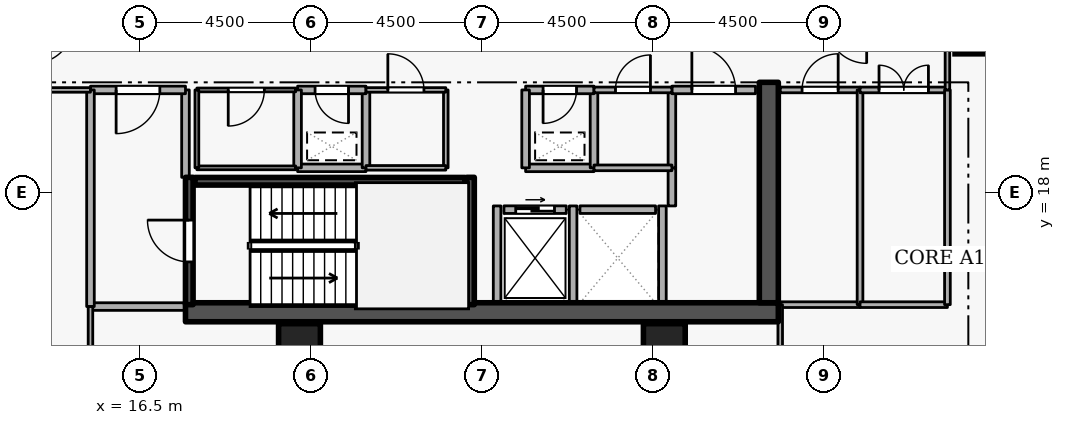
"""IFC4 building model, lengths in metres.
Left out: names, types, materials, properties, quantities, classifications, styles, units other than length and angle.
Written with IfcOpenShell. Run it as: python <this file> out.ifc"""

import sys

from ifc_helpers import new_model, si_unit, direction, frame, frame_2d, origin, origin_2d, place, context, subcontext, project, spatial, rectangle, extrude, element, fill, save


model = new_model("IFC4")
c1 = context("Model", 3, precision=1e-05, world=origin(), true_north=direction((0.0, 1.0)))
c2 = subcontext(c1, "Body", "Model", "MODEL_VIEW")
j1 = project(units=[si_unit("LENGTHUNIT", "METRE"), si_unit("PLANEANGLEUNIT", "RADIAN")], contexts=[c1])
p1 = place(None, origin())
s1 = spatial("IfcSite", under=j1, at=p1, CompositionType="ELEMENT")
p2 = place(p1, origin())
s2 = spatial("IfcBuilding", under=s1, at=p2, CompositionType="ELEMENT")
p3 = place(p2, frame((0.0, 0.0, 159.9)))
s3 = spatial("IfcBuildingStorey", under=s2, at=p3, CompositionType="ELEMENT", Elevation=159.9)
p4 = place(p3, frame((17.7, 14.85, 0.0), z_axis=(0.0, 0.0, 1.0), x_axis=(1.0, 0.0, 0.0)))
e1 = element("IfcWall", 1, at=p4, inside=s3, PredefinedType="SHEAR", context=c2, shape_type="SweptSolid", body=[
    extrude(rectangle(XDim=15.6, YDim=0.5, at=frame_2d((7.8, 0.0))), origin(), (0.0, 0.0, 1.0), 3.6),
])
p5 = place(p3, frame((33.05, 15.1, 0.0), z_axis=(0.0, 0.0, 1.0), x_axis=(0.0, 1.0, 0.0)))
e2 = element("IfcWall", 2, at=p5, inside=s3, PredefinedType="SHEAR", context=c2, shape_type="SweptSolid", body=[
    extrude(rectangle(XDim=5.8, YDim=0.5, at=frame_2d((2.9, 0.0))), origin(), (0.0, 0.0, 1.0), 3.6),
])
for number, where, z_axis, x_axis in (
    (3, (38.5, 22.2, 0.0), (0.0, 0.0, 1.0), (1.0, 0.0, 0.0)),
    (4, (20.7, 14.0, 0.0), (0.0, 0.0, 1.0), (1.0, 0.0, 0.0)),
    (5, (30.3, 14.0, 0.0), (0.0, 0.0, 1.0), (1.0, 0.0, 0.0)),
):
    element("IfcColumn", number, at=place(p3, frame(where, z_axis=z_axis, x_axis=x_axis)), inside=s3, PredefinedType="COLUMN", context=c2, shape_type="SweptSolid", body=[
        extrude(rectangle(XDim=1.1, YDim=1.1, at=origin_2d()), origin(), (0.0, 0.0, 1.0), 3.6),
    ])
p6 = place(p3, frame((26.08, 17.55, 0.0), z_axis=(0.0, 0.0, 1.0), x_axis=(1.0, 0.0, 0.0)))
e6 = element("IfcWall", 6, at=p6, inside=s3, PredefinedType="STANDARD", context=c2, shape_type="SweptSolid", body=[
    extrude(rectangle(XDim=1.64, YDim=0.2, at=frame_2d((0.82, 0.0))), origin(), (0.0, 0.0, 1.0), 3.34),
])
p7 = place(p6, frame((0.31, 0.0, 0.0)))
e7 = element("IfcOpeningElement", 7, at=p7, cuts=e6, PredefinedType="OPENING", context=c2, shape_type="SweptSolid", body=[
    extrude(rectangle(XDim=1.02, YDim=2.06, at=frame_2d((0.51, 1.03))), frame((0.0, 0.11, 0.0), z_axis=(0.0, -1.0, 0.0), x_axis=(1.0, 0.0, 0.0)), (0.0, 0.0, 1.0), 0.22),
])
p8 = place(p3, frame((28.08, 17.55, 0.0), z_axis=(0.0, 0.0, 1.0), x_axis=(1.0, 0.0, 0.0)))
e8 = element("IfcWall", 8, at=p8, inside=s3, PredefinedType="STANDARD", context=c2, shape_type="SweptSolid", body=[
    extrude(rectangle(XDim=1.99, YDim=0.2, at=frame_2d((0.995, 0.0))), origin(), (0.0, 0.0, 1.0), 3.34),
])
for number, where, z_axis, x_axis in (
    (9, (27.9, 15.112, 0.0), (0.0, 0.0, 1.0), (0.0, 1.0, 0.0)),
    (10, (25.9, 15.112, 0.0), (0.0, 0.0, 1.0), (0.0, 1.0, 0.0)),
    (11, (30.25, 15.112, 0.0), (0.0, 0.0, 1.0), (0.0, 1.0, 0.0)),
):
    element("IfcWall", number, at=place(p3, frame(where, z_axis=z_axis, x_axis=x_axis)), inside=s3, PredefinedType="STANDARD", context=c2, shape_type="SweptSolid", body=[
        extrude(rectangle(XDim=2.536, YDim=0.2, at=frame_2d((1.268, 0.0))), origin(), (0.0, 0.0, 1.0), 3.34),
    ])
p9 = place(p3, frame((17.8, 15.05, 0.0), z_axis=(0.0, 0.0, 1.0), x_axis=(0.0, 1.0, 0.0)))
e12 = element("IfcWall", 12, at=p9, inside=s3, PredefinedType="SHEAR", context=c2, shape_type="SweptSolid", body=[
    extrude(rectangle(XDim=3.35, YDim=0.2, at=frame_2d((1.675, 0.0))), origin(), (0.0, 0.0, 1.0), 3.6),
])
p10 = place(p9, frame((1.125, 0.0, 0.0)))
e13 = element("IfcOpeningElement", 13, at=p10, cuts=e12, PredefinedType="OPENING", context=c2, shape_type="SweptSolid", body=[
    extrude(rectangle(XDim=1.1, YDim=2.1, at=frame_2d((0.55, 1.05))), frame((0.0, 0.11, 0.0), z_axis=(0.0, -1.0, 0.0), x_axis=(1.0, 0.0, 0.0)), (0.0, 0.0, 1.0), 0.22),
])
p11 = place(p3, frame((25.2, 18.4, 0.0), z_axis=(0.0, 0.0, 1.0), x_axis=(0.0, -1.0, 0.0)))
e14 = element("IfcWall", 14, at=p11, inside=s3, PredefinedType="SHEAR", context=c2, shape_type="SweptSolid", body=[
    extrude(rectangle(XDim=3.35, YDim=0.2, at=frame_2d((1.675, 0.0))), origin(), (0.0, 0.0, 1.0), 3.6),
])
p12 = place(p3, frame((25.05, 18.297, 0.0), z_axis=(0.0, 0.0, 1.0), x_axis=(-1.0, 0.0, 0.0)))
e15 = element("IfcWall", 15, at=p12, inside=s3, PredefinedType="SHEAR", context=c2, shape_type="SweptSolid", body=[
    extrude(rectangle(XDim=7.1, YDim=0.2, at=frame_2d((3.55, 0.0))), origin(), (0.0, 0.0, 1.0), 3.6),
])
p13 = place(p3, frame((15.2, 15.0, 0.0), z_axis=(0.0, 0.0, 1.0), x_axis=(1.0, 0.0, 0.0)))
e16 = element("IfcWall", 16, at=p13, inside=s3, PredefinedType="STANDARD", context=c2, shape_type="SweptSolid", body=[
    extrude(rectangle(XDim=2.5, YDim=0.2, at=frame_2d((1.25, 0.0))), origin(), (0.0, 0.0, 1.0), 3.34),
])
p14 = place(p3, frame((17.7, 18.4, 0.0), z_axis=(0.0, 0.0, 1.0), x_axis=(0.0, 1.0, 0.0)))
e17 = element("IfcWall", 17, at=p14, inside=s3, PredefinedType="STANDARD", context=c2, shape_type="SweptSolid", body=[
    extrude(rectangle(XDim=2.3, YDim=0.2, at=frame_2d((1.15, 0.0))), origin(), (0.0, 0.0, 1.0), 2.545),
])
p15 = place(p3, frame((17.7, 20.7, 0.0), z_axis=(0.0, 0.0, 1.0), x_axis=(-1.0, 0.0, 0.0)))
e18 = element("IfcWall", 18, at=p15, inside=s3, PredefinedType="STANDARD", context=c2, shape_type="SweptSolid", body=[
    extrude(rectangle(XDim=2.5, YDim=0.2, at=frame_2d((1.25, 0.0))), origin(), (0.0, 0.0, 1.0), 3.34),
])
p16 = place(p15, frame((0.675, 0.0, 0.0)))
e19 = element("IfcOpeningElement", 19, at=p16, cuts=e18, PredefinedType="OPENING", context=c2, shape_type="SweptSolid", body=[
    extrude(rectangle(XDim=1.15, YDim=2.1, at=frame_2d((0.575, 1.05))), frame((0.0, 0.11, 0.0), z_axis=(0.0, -1.0, 0.0), x_axis=(1.0, 0.0, 0.0)), (0.0, 0.0, 1.0), 0.22),
])
p17 = place(p3, frame((15.2, 20.7, 0.0), z_axis=(0.0, 0.0, 1.0), x_axis=(0.0, -1.0, 0.0)))
e20 = element("IfcWall", 20, at=p17, inside=s3, PredefinedType="STANDARD", context=c2, shape_type="SweptSolid", body=[
    extrude(rectangle(XDim=5.7, YDim=0.2, at=frame_2d((2.85, 0.0))), origin(), (0.0, 0.0, 1.0), 3.34),
])
p18 = place(p3, frame((26.65, 18.65, 0.0), z_axis=(0.0, 0.0, 1.0), x_axis=(1.0, 0.0, 0.0)))
e21 = element("IfcWall", 21, at=p18, inside=s3, PredefinedType="STANDARD", context=c2, shape_type="SweptSolid", body=[
    extrude(rectangle(XDim=1.8, YDim=0.2, at=frame_2d((0.9, 0.0))), origin(), (0.0, 0.0, 1.0), 3.34),
])
p19 = place(p3, frame((28.45, 18.65, 0.0), z_axis=(0.0, 0.0, 1.0), x_axis=(0.0, 1.0, 0.0)))
e22 = element("IfcWall", 22, at=p19, inside=s3, PredefinedType="STANDARD", context=c2, shape_type="SweptSolid", body=[
    extrude(rectangle(XDim=2.05, YDim=0.2, at=frame_2d((1.025, 0.0))), origin(), (0.0, 0.0, 1.0), 3.34),
])
p20 = place(p3, frame((28.45, 20.7, 0.0), z_axis=(0.0, 0.0, 1.0), x_axis=(-1.0, 0.0, 0.0)))
e23 = element("IfcWall", 23, at=p20, inside=s3, PredefinedType="STANDARD", context=c2, shape_type="SweptSolid", body=[
    extrude(rectangle(XDim=1.8, YDim=0.2, at=frame_2d((0.9, 0.0))), origin(), (0.0, 0.0, 1.0), 3.34),
])
p21 = place(p20, frame((0.46, 0.0, 0.0)))
e24 = element("IfcOpeningElement", 24, at=p21, cuts=e23, PredefinedType="OPENING", context=c2, shape_type="SweptSolid", body=[
    extrude(rectangle(XDim=0.88, YDim=2.04, at=frame_2d((0.44, 1.02))), frame((0.0, 0.11, 0.0), z_axis=(0.0, -1.0, 0.0), x_axis=(1.0, 0.0, 0.0)), (0.0, 0.0, 1.0), 0.22),
])
p22 = place(p3, frame((26.65, 20.7, 0.0), z_axis=(0.0, 0.0, 1.0), x_axis=(0.0, -1.0, 0.0)))
e25 = element("IfcWall", 25, at=p22, inside=s3, PredefinedType="STANDARD", context=c2, shape_type="SweptSolid", body=[
    extrude(rectangle(XDim=2.05, YDim=0.2, at=frame_2d((1.025, 0.0))), origin(), (0.0, 0.0, 1.0), 3.34),
])
p23 = place(p3, frame((20.65, 18.65, 0.0), z_axis=(0.0, 0.0, 1.0), x_axis=(1.0, 0.0, 0.0)))
e26 = element("IfcWall", 26, at=p23, inside=s3, PredefinedType="STANDARD", context=c2, shape_type="SweptSolid", body=[
    extrude(rectangle(XDim=1.8, YDim=0.2, at=frame_2d((0.9, 0.0))), origin(), (0.0, 0.0, 1.0), 3.34),
])
p24 = place(p3, frame((22.45, 18.65, 0.0), z_axis=(0.0, 0.0, 1.0), x_axis=(0.0, 1.0, 0.0)))
e27 = element("IfcWall", 27, at=p24, inside=s3, PredefinedType="STANDARD", context=c2, shape_type="SweptSolid", body=[
    extrude(rectangle(XDim=2.05, YDim=0.2, at=frame_2d((1.025, 0.0))), origin(), (0.0, 0.0, 1.0), 3.34),
])
p25 = place(p3, frame((22.45, 20.7, 0.0), z_axis=(0.0, 0.0, 1.0), x_axis=(-1.0, 0.0, 0.0)))
e28 = element("IfcWall", 28, at=p25, inside=s3, PredefinedType="STANDARD", context=c2, shape_type="SweptSolid", body=[
    extrude(rectangle(XDim=1.8, YDim=0.2, at=frame_2d((0.9, 0.0))), origin(), (0.0, 0.0, 1.0), 3.34),
])
p26 = place(p25, frame((0.46, 0.0, 0.0)))
e29 = element("IfcOpeningElement", 29, at=p26, cuts=e28, PredefinedType="OPENING", context=c2, shape_type="SweptSolid", body=[
    extrude(rectangle(XDim=0.88, YDim=2.04, at=frame_2d((0.44, 1.02))), frame((0.0, 0.11, 0.0), z_axis=(0.0, -1.0, 0.0), x_axis=(1.0, 0.0, 0.0)), (0.0, 0.0, 1.0), 0.22),
])
p27 = place(p3, frame((20.65, 20.7, 0.0), z_axis=(0.0, 0.0, 1.0), x_axis=(0.0, -1.0, 0.0)))
e30 = element("IfcWall", 30, at=p27, inside=s3, PredefinedType="STANDARD", context=c2, shape_type="SweptSolid", body=[
    extrude(rectangle(XDim=2.05, YDim=0.2, at=frame_2d((1.025, 0.0))), origin(), (0.0, 0.0, 1.0), 3.34),
])
p28 = place(p3, frame((30.5, 17.648, 0.0), z_axis=(0.0, 0.0, 1.0), x_axis=(0.0, 1.0, 0.0)))
e31 = element("IfcWall", 31, at=p28, inside=s3, PredefinedType="STANDARD", context=c2, shape_type="SweptSolid", body=[
    extrude(rectangle(XDim=1.002, YDim=0.2, at=frame_2d((0.501, 0.0))), origin(), (0.0, 0.0, 1.0), 3.34),
])
p29 = place(p3, frame((30.5, 18.65, 0.0), z_axis=(0.0, 0.0, 1.0), x_axis=(0.0, 1.0, 0.0)))
e32 = element("IfcWall", 32, at=p29, inside=s3, PredefinedType="STANDARD", context=c2, shape_type="SweptSolid", body=[
    extrude(rectangle(XDim=2.05, YDim=0.2, at=frame_2d((1.025, 0.0))), origin(), (0.0, 0.0, 1.0), 3.34),
])
p30 = place(p3, frame((30.5, 20.7, 0.0), z_axis=(0.0, 0.0, 1.0), x_axis=(1.0, 0.0, 0.0)))
e33 = element("IfcWall", 33, at=p30, inside=s3, PredefinedType="STANDARD", context=c2, shape_type="SweptSolid", body=[
    extrude(rectangle(XDim=2.2, YDim=0.2, at=frame_2d((1.1, 0.0))), origin(), (0.0, 0.0, 1.0), 3.34),
])
p31 = place(p30, frame((0.525, 0.0, 0.0)))
e34 = element("IfcOpeningElement", 34, at=p31, cuts=e33, PredefinedType="OPENING", context=c2, shape_type="SweptSolid", body=[
    extrude(rectangle(XDim=1.15, YDim=2.1, at=frame_2d((0.575, 1.05))), frame((0.0, 0.11, 0.0), z_axis=(0.0, -1.0, 0.0), x_axis=(1.0, 0.0, 0.0)), (0.0, 0.0, 1.0), 0.22),
])
p32 = place(p3, frame((18.0, 18.65, 0.0), z_axis=(0.0, 0.0, 1.0), x_axis=(1.0, 0.0, 0.0)))
e35 = element("IfcWall", 35, at=p32, inside=s3, PredefinedType="PARTITIONING", context=c2, shape_type="SweptSolid", body=[
    extrude(rectangle(XDim=2.6, YDim=0.1, at=frame_2d((1.3, 0.0))), origin(), (0.0, 0.0, 1.0), 3.34),
])
p33 = place(p3, frame((20.6, 20.7, 0.0), z_axis=(0.0, 0.0, 1.0), x_axis=(-1.0, 0.0, 0.0)))
e36 = element("IfcWall", 36, at=p33, inside=s3, PredefinedType="PARTITIONING", context=c2, shape_type="SweptSolid", body=[
    extrude(rectangle(XDim=2.6, YDim=0.1, at=frame_2d((1.3, 0.0))), origin(), (0.0, 0.0, 1.0), 3.34),
])
p34 = place(p33, frame((0.825, 0.0, 0.0)))
e37 = element("IfcOpeningElement", 37, at=p34, cuts=e36, PredefinedType="OPENING", context=c2, shape_type="SweptSolid", body=[
    extrude(rectangle(XDim=0.95, YDim=2.1, at=frame_2d((0.475, 1.05))), frame((0.0, 0.06, 0.0), z_axis=(0.0, -1.0, 0.0), x_axis=(1.0, 0.0, 0.0)), (0.0, 0.0, 1.0), 0.12),
])
p35 = place(p3, frame((18.0, 20.7, 0.0), z_axis=(0.0, 0.0, 1.0), x_axis=(0.0, -1.0, 0.0)))
e38 = element("IfcWall", 38, at=p35, inside=s3, PredefinedType="PARTITIONING", context=c2, shape_type="SweptSolid", body=[
    extrude(rectangle(XDim=2.05, YDim=0.1, at=frame_2d((1.025, 0.0))), origin(), (0.0, 0.0, 1.0), 2.545),
])
p36 = place(p3, frame((24.55, 20.7, 0.0), z_axis=(0.0, 0.0, 1.0), x_axis=(0.0, -1.0, 0.0)))
e39 = element("IfcWall", 39, at=p36, inside=s3, PredefinedType="PARTITIONING", context=c2, shape_type="SweptSolid", body=[
    extrude(rectangle(XDim=2.05, YDim=0.12, at=frame_2d((1.025, 0.0))), origin(), (0.0, 0.0, 1.0), 3.34),
])
p37 = place(p3, frame((24.55, 18.65, 0.0), z_axis=(0.0, 0.0, 1.0), x_axis=(-1.0, 0.0, 0.0)))
e40 = element("IfcWall", 40, at=p37, inside=s3, PredefinedType="PARTITIONING", context=c2, shape_type="SweptSolid", body=[
    extrude(rectangle(XDim=2.1, YDim=0.12, at=frame_2d((1.05, 0.0))), origin(), (0.0, 0.0, 1.0), 3.34),
])
p38 = place(p3, frame((22.45, 20.7, 0.0), z_axis=(0.0, 0.0, 1.0), x_axis=(1.0, 0.0, 0.0)))
e41 = element("IfcWall", 41, at=p38, inside=s3, PredefinedType="PARTITIONING", context=c2, shape_type="SweptSolid", body=[
    extrude(rectangle(XDim=2.1, YDim=0.12, at=frame_2d((1.05, 0.0))), origin(), (0.0, 0.0, 1.0), 3.34),
])
p39 = place(p38, frame((0.575, 0.0, 0.0)))
e42 = element("IfcOpeningElement", 42, at=p39, cuts=e41, PredefinedType="OPENING", context=c2, shape_type="SweptSolid", body=[
    extrude(rectangle(XDim=0.95, YDim=2.1, at=frame_2d((0.475, 1.05))), frame((0.0, 0.07, 0.0), z_axis=(0.0, -1.0, 0.0), x_axis=(1.0, 0.0, 0.0)), (0.0, 0.0, 1.0), 0.14),
])
p40 = place(p3, frame((30.5, 18.65, 0.0), z_axis=(0.0, 0.0, 1.0), x_axis=(-1.0, 0.0, 0.0)))
e43 = element("IfcWall", 43, at=p40, inside=s3, PredefinedType="PARTITIONING", context=c2, shape_type="SweptSolid", body=[
    extrude(rectangle(XDim=2.05, YDim=0.15, at=frame_2d((1.025, 0.0))), origin(), (0.0, 0.0, 1.0), 3.34),
])
p41 = place(p3, frame((28.45, 20.7, 0.0), z_axis=(0.0, 0.0, 1.0), x_axis=(1.0, 0.0, 0.0)))
e44 = element("IfcWall", 44, at=p41, inside=s3, PredefinedType="PARTITIONING", context=c2, shape_type="SweptSolid", body=[
    extrude(rectangle(XDim=2.05, YDim=0.15, at=frame_2d((1.025, 0.0))), origin(), (0.0, 0.0, 1.0), 3.34),
])
p42 = place(p41, frame((0.565, 0.0, 0.0)))
e45 = element("IfcOpeningElement", 45, at=p42, cuts=e44, PredefinedType="OPENING", context=c2, shape_type="SweptSolid", body=[
    extrude(rectangle(XDim=0.92, YDim=2.08, at=frame_2d((0.46, 1.04))), frame((0.0, 0.085, 0.0), z_axis=(0.0, -1.0, 0.0), x_axis=(1.0, 0.0, 0.0)), (0.0, 0.0, 1.0), 0.17),
])
p43 = place(p3, frame((35.45, 15.05, 0.0), z_axis=(0.0, 0.0, 1.0), x_axis=(-1.0, 0.0, 0.0)))
e46 = element("IfcWall", 46, at=p43, inside=s3, PredefinedType="PARTITIONING", context=c2, shape_type="SweptSolid", body=[
    extrude(rectangle(XDim=2.1, YDim=0.15, at=frame_2d((1.05, 0.0))), origin(), (0.0, 0.0, 1.0), 3.34),
])
p44 = place(p3, frame((33.35, 20.7, 0.0), z_axis=(0.0, 0.0, 1.0), x_axis=(1.0, 0.0, 0.0)))
e47 = element("IfcWall", 47, at=p44, inside=s3, PredefinedType="PARTITIONING", context=c2, shape_type="SweptSolid", body=[
    extrude(rectangle(XDim=2.1, YDim=0.15, at=frame_2d((1.05, 0.0))), origin(), (0.0, 0.0, 1.0), 3.34),
])
p45 = place(p44, frame((0.575, 0.0, 0.0)))
e48 = element("IfcOpeningElement", 48, at=p45, cuts=e47, PredefinedType="OPENING", context=c2, shape_type="SweptSolid", body=[
    extrude(rectangle(XDim=0.95, YDim=2.1, at=frame_2d((0.475, 1.05))), frame((0.0, 0.085, 0.0), z_axis=(0.0, -1.0, 0.0), x_axis=(1.0, 0.0, 0.0)), (0.0, 0.0, 1.0), 0.17),
])
p46 = place(p3, frame((35.45, 20.7, 0.0), z_axis=(0.0, 0.0, 1.0), x_axis=(0.0, -1.0, 0.0)))
e49 = element("IfcWall", 49, at=p46, inside=s3, PredefinedType="PARTITIONING", context=c2, shape_type="SweptSolid", body=[
    extrude(rectangle(XDim=5.65, YDim=0.15, at=frame_2d((2.825, 0.0))), origin(), (0.0, 0.0, 1.0), 3.34),
])
p47 = place(p3, frame((37.75, 15.05, 0.0), z_axis=(0.0, 0.0, 1.0), x_axis=(-1.0, 0.0, 0.0)))
e50 = element("IfcWall", 50, at=p47, inside=s3, PredefinedType="PARTITIONING", context=c2, shape_type="SweptSolid", body=[
    extrude(rectangle(XDim=2.3, YDim=0.15, at=frame_2d((1.15, 0.0))), origin(), (0.0, 0.0, 1.0), 3.34),
])
p48 = place(p3, frame((35.45, 20.7, 0.0), z_axis=(0.0, 0.0, 1.0), x_axis=(1.0, 0.0, 0.0)))
e51 = element("IfcWall", 51, at=p48, inside=s3, PredefinedType="PARTITIONING", context=c2, shape_type="SweptSolid", body=[
    extrude(rectangle(XDim=2.3, YDim=0.15, at=frame_2d((1.15, 0.0))), origin(), (0.0, 0.0, 1.0), 3.34),
])
p49 = place(p48, frame((0.5, 0.0, 0.0)))
e52 = element("IfcOpeningElement", 52, at=p49, cuts=e51, PredefinedType="OPENING", context=c2, shape_type="SweptSolid", body=[
    extrude(rectangle(XDim=1.3, YDim=2.12, at=frame_2d((0.65, 1.06))), frame((0.0, 0.085, 0.0), z_axis=(0.0, -1.0, 0.0), x_axis=(1.0, 0.0, 0.0)), (0.0, 0.0, 1.0), 0.17),
])
p50 = place(p3, frame((37.75, 20.7, 0.0), z_axis=(0.0, 0.0, 1.0), x_axis=(0.0, -1.0, 0.0)))
e53 = element("IfcWall", 53, at=p50, inside=s3, PredefinedType="PARTITIONING", context=c2, shape_type="SweptSolid", body=[
    extrude(rectangle(XDim=5.65, YDim=0.15, at=frame_2d((2.825, 0.0))), origin(), (0.0, 0.0, 1.0), 3.34),
])
p51 = place(p3, frame((13.25, 20.7, 0.0), z_axis=(0.0, 0.0, 1.0), x_axis=(1.0, 0.0, 0.0)))
e54 = element("IfcWall", 54, at=p51, inside=s3, PredefinedType="PARTITIONING", context=c2, shape_type="SweptSolid", body=[
    extrude(rectangle(XDim=1.95, YDim=0.12, at=frame_2d((0.975, 0.0))), origin(), (0.0, 0.0, 1.0), 3.34),
])
p52 = place(p3, frame((15.2, 15.0, 0.0), z_axis=(0.0, 0.0, 1.0), x_axis=(0.0, -1.0, 0.0)))
e55 = element("IfcWall", 55, at=p52, inside=s3, PredefinedType="PARTITIONING", context=c2, shape_type="SweptSolid", body=[
    extrude(rectangle(XDim=11.72, YDim=0.12, at=frame_2d((5.86, 0.0))), origin(), (0.0, 0.0, 1.0), 3.34),
])
p53 = place(p3, frame((33.35, 3.28, 0.0), z_axis=(0.0, 0.0, 1.0), x_axis=(0.0, 1.0, 0.0)))
e56 = element("IfcWall", 56, at=p53, inside=s3, PredefinedType="PARTITIONING", context=c2, shape_type="SweptSolid", body=[
    extrude(rectangle(XDim=11.77, YDim=0.12, at=frame_2d((5.885, 0.0))), origin(), (0.0, 0.0, 1.0), 2.545),
])
p54 = place(p3, frame((37.75, 20.7, 0.0), z_axis=(0.0, 0.0, 1.0), x_axis=(0.0, 1.0, 0.0)))
e57 = element("IfcWall", 57, at=p54, inside=s3, PredefinedType="PARTITIONING", context=c2, shape_type="SweptSolid", body=[
    extrude(rectangle(XDim=1.75, YDim=0.12, at=frame_2d((0.875, 0.0))), origin(), (0.0, 0.0, 1.0), 3.34),
])
p55 = place(p7, origin())
e58 = element("IfcDoor", 58, at=p55, inside=s3, OperationType="SLIDING_TO_LEFT", PredefinedType="DOOR", context=c2, shape_type="SweptSolid", body=[
    extrude(rectangle(XDim=1.02, YDim=2.06, at=frame_2d((0.51, 1.03))), frame((0.0, 0.025, 0.0), z_axis=(0.0, -1.0, 0.0), x_axis=(1.0, 0.0, 0.0)), (0.0, 0.0, 1.0), 0.05),
])
fill(e7, e58)
p56 = place(p10, origin())
e59 = element("IfcDoor", 59, at=p56, inside=s3, OperationType="SINGLE_SWING_RIGHT", PredefinedType="DOOR", context=c2, shape_type="SweptSolid", body=[
    extrude(rectangle(XDim=1.1, YDim=2.1, at=frame_2d((0.55, 1.05))), frame((0.0, 0.025, 0.0), z_axis=(0.0, -1.0, 0.0), x_axis=(1.0, 0.0, 0.0)), (0.0, 0.0, 1.0), 0.05),
])
fill(e13, e59)
p57 = place(p16, origin())
e60 = element("IfcDoor", 60, at=p57, inside=s3, OperationType="SINGLE_SWING_RIGHT", PredefinedType="DOOR", context=c2, shape_type="SweptSolid", body=[
    extrude(rectangle(XDim=1.15, YDim=2.1, at=frame_2d((0.575, 1.05))), frame((0.0, 0.025, 0.0), z_axis=(0.0, -1.0, 0.0), x_axis=(1.0, 0.0, 0.0)), (0.0, 0.0, 1.0), 0.05),
])
fill(e19, e60)
p58 = place(p21, origin())
e61 = element("IfcDoor", 61, at=p58, inside=s3, OperationType="SINGLE_SWING_RIGHT", PredefinedType="DOOR", context=c2, shape_type="SweptSolid", body=[
    extrude(rectangle(XDim=0.88, YDim=2.04, at=frame_2d((0.44, 1.02))), frame((0.0, 0.025, 0.0), z_axis=(0.0, -1.0, 0.0), x_axis=(1.0, 0.0, 0.0)), (0.0, 0.0, 1.0), 0.05),
])
fill(e24, e61)
p59 = place(p26, origin())
e62 = element("IfcDoor", 62, at=p59, inside=s3, OperationType="SINGLE_SWING_LEFT", PredefinedType="DOOR", context=c2, shape_type="SweptSolid", body=[
    extrude(rectangle(XDim=0.88, YDim=2.04, at=frame_2d((0.44, 1.02))), frame((0.0, 0.025, 0.0), z_axis=(0.0, -1.0, 0.0), x_axis=(1.0, 0.0, 0.0)), (0.0, 0.0, 1.0), 0.05),
])
fill(e29, e62)
p60 = place(p34, origin())
e63 = element("IfcDoor", 63, at=p60, inside=s3, OperationType="SINGLE_SWING_RIGHT", PredefinedType="DOOR", context=c2, shape_type="SweptSolid", body=[
    extrude(rectangle(XDim=0.95, YDim=2.1, at=frame_2d((0.475, 1.05))), frame((0.0, 0.025, 0.0), z_axis=(0.0, -1.0, 0.0), x_axis=(1.0, 0.0, 0.0)), (0.0, 0.0, 1.0), 0.05),
])
fill(e37, e63)
p61 = place(p39, origin())
e64 = element("IfcDoor", 64, at=p61, inside=s3, OperationType="SINGLE_SWING_LEFT", PredefinedType="DOOR", context=c2, shape_type="SweptSolid", body=[
    extrude(rectangle(XDim=0.95, YDim=2.1, at=frame_2d((0.475, 1.05))), frame((0.0, 0.025, 0.0), z_axis=(0.0, -1.0, 0.0), x_axis=(1.0, 0.0, 0.0)), (0.0, 0.0, 1.0), 0.05),
])
fill(e42, e64)
p62 = place(p42, origin())
e65 = element("IfcDoor", 65, at=p62, inside=s3, OperationType="SINGLE_SWING_RIGHT", PredefinedType="DOOR", context=c2, shape_type="SweptSolid", body=[
    extrude(rectangle(XDim=0.92, YDim=2.08, at=frame_2d((0.46, 1.04))), frame((0.0, 0.025, 0.0), z_axis=(0.0, -1.0, 0.0), x_axis=(1.0, 0.0, 0.0)), (0.0, 0.0, 1.0), 0.05),
])
fill(e45, e65)
p63 = place(p31, origin())
e66 = element("IfcDoor", 66, at=p63, inside=s3, OperationType="SINGLE_SWING_LEFT", PredefinedType="DOOR", context=c2, shape_type="SweptSolid", body=[
    extrude(rectangle(XDim=1.15, YDim=2.1, at=frame_2d((0.575, 1.05))), frame((0.0, 0.025, 0.0), z_axis=(0.0, -1.0, 0.0), x_axis=(1.0, 0.0, 0.0)), (0.0, 0.0, 1.0), 0.05),
])
fill(e34, e66)
p64 = place(p45, origin())
e67 = element("IfcDoor", 67, at=p64, inside=s3, OperationType="SINGLE_SWING_RIGHT", PredefinedType="DOOR", context=c2, shape_type="SweptSolid", body=[
    extrude(rectangle(XDim=0.95, YDim=2.1, at=frame_2d((0.475, 1.05))), frame((0.0, 0.025, 0.0), z_axis=(0.0, -1.0, 0.0), x_axis=(1.0, 0.0, 0.0)), (0.0, 0.0, 1.0), 0.05),
])
fill(e48, e67)
p65 = place(p49, origin())
e68 = element("IfcDoor", 68, at=p65, inside=s3, OperationType="DOUBLE_DOOR_SINGLE_SWING", PredefinedType="DOOR", context=c2, shape_type="SweptSolid", body=[
    extrude(rectangle(XDim=1.3, YDim=2.12, at=frame_2d((0.65, 1.06))), frame((0.0, 0.025, 0.0), z_axis=(0.0, -1.0, 0.0), x_axis=(1.0, 0.0, 0.0)), (0.0, 0.0, 1.0), 0.05),
])
fill(e52, e68)
save(model, sys.argv[1])
